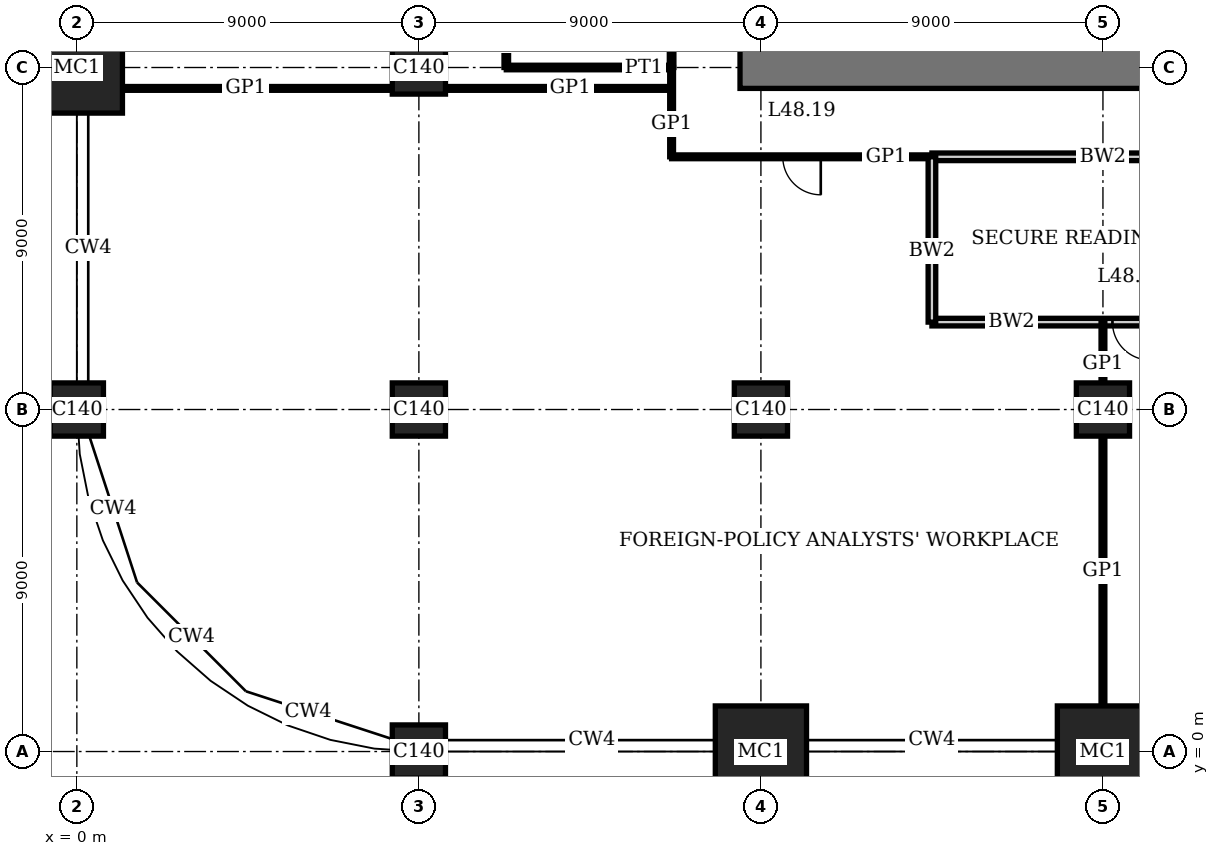
"""IFC4 building model, lengths in metres.
Left out: names, types, materials, properties, quantities, classifications, styles, units other than length and angle.
Written with IfcOpenShell. Run it as: python <this file> out.ifc"""

import sys

from ifc_helpers import new_model, si_unit, direction, frame, frame_2d, origin, origin_2d, place, context, subcontext, project, spatial, rectangle, extrude, element, fill, save


model = new_model("IFC4")
c1 = context("Model", 3, precision=1e-05, world=origin(), true_north=direction((0.0, 1.0)))
c2 = subcontext(c1, "Body", "Model", "MODEL_VIEW")
j1 = project(units=[si_unit("LENGTHUNIT", "METRE"), si_unit("PLANEANGLEUNIT", "RADIAN")], contexts=[c1])
p1 = place(None, origin())
s1 = spatial("IfcSite", under=j1, at=p1, CompositionType="ELEMENT")
p2 = place(p1, origin())
s2 = spatial("IfcBuilding", under=s1, at=p2, CompositionType="ELEMENT")
p3 = place(p2, frame((0.0, 0.0, 198.2)))
s3 = spatial("IfcBuildingStorey", under=s2, at=p3, CompositionType="ELEMENT", Elevation=198.2)
p4 = place(p3, frame((0.0, 9.0, 0.0), z_axis=(0.0, 0.0, 1.0), x_axis=(1.0, 0.0, 0.0)))
e1 = element("IfcColumn", 1, at=p4, inside=s3, PredefinedType="COLUMN", context=c2, shape_type="SweptSolid", body=[
    extrude(rectangle(XDim=1.4, YDim=1.4, at=origin_2d()), origin(), (0.0, 0.0, 1.0), 4.0),
])
p5 = place(p3, frame((0.0, 18.0, 0.0), z_axis=(0.0, 0.0, 1.0), x_axis=(1.0, 0.0, 0.0)))
e2 = element("IfcColumn", 2, at=p5, inside=s3, PredefinedType="COLUMN", context=c2, shape_type="SweptSolid", body=[
    extrude(rectangle(XDim=2.4, YDim=2.4, at=origin_2d()), origin(), (0.0, 0.0, 1.0), 4.0),
])
for number, where, z_axis, x_axis in (
    (3, (9.0, 0.0, 0.0), (0.0, 0.0, 1.0), (1.0, 0.0, 0.0)),
    (4, (9.0, 9.0, 0.0), (0.0, 0.0, 1.0), (1.0, 0.0, 0.0)),
    (5, (9.0, 18.0, 0.0), (0.0, 0.0, 1.0), (1.0, 0.0, 0.0)),
):
    element("IfcColumn", number, at=place(p3, frame(where, z_axis=z_axis, x_axis=x_axis)), inside=s3, PredefinedType="COLUMN", context=c2, shape_type="SweptSolid", body=[
        extrude(rectangle(XDim=1.4, YDim=1.4, at=origin_2d()), origin(), (0.0, 0.0, 1.0), 4.0),
    ])
p6 = place(p3, frame((18.0, 0.0, 0.0), z_axis=(0.0, 0.0, 1.0), x_axis=(1.0, 0.0, 0.0)))
e6 = element("IfcColumn", 6, at=p6, inside=s3, PredefinedType="COLUMN", context=c2, shape_type="SweptSolid", body=[
    extrude(rectangle(XDim=2.4, YDim=2.4, at=origin_2d()), origin(), (0.0, 0.0, 1.0), 4.0),
])
p7 = place(p3, frame((18.0, 9.0, 0.0), z_axis=(0.0, 0.0, 1.0), x_axis=(1.0, 0.0, 0.0)))
e7 = element("IfcColumn", 7, at=p7, inside=s3, PredefinedType="COLUMN", context=c2, shape_type="SweptSolid", body=[
    extrude(rectangle(XDim=1.4, YDim=1.4, at=origin_2d()), origin(), (0.0, 0.0, 1.0), 4.0),
])
p8 = place(p3, frame((27.0, 0.0, 0.0), z_axis=(0.0, 0.0, 1.0), x_axis=(1.0, 0.0, 0.0)))
e8 = element("IfcColumn", 8, at=p8, inside=s3, PredefinedType="COLUMN", context=c2, shape_type="SweptSolid", body=[
    extrude(rectangle(XDim=2.4, YDim=2.4, at=origin_2d()), origin(), (0.0, 0.0, 1.0), 4.0),
])
p9 = place(p3, frame((27.0, 9.0, 0.0), z_axis=(0.0, 0.0, 1.0), x_axis=(1.0, 0.0, 0.0)))
e9 = element("IfcColumn", 9, at=p9, inside=s3, PredefinedType="COLUMN", context=c2, shape_type="SweptSolid", body=[
    extrude(rectangle(XDim=1.4, YDim=1.4, at=origin_2d()), origin(), (0.0, 0.0, 1.0), 4.0),
])
p10 = place(p3, frame((17.45, 18.0, 0.0), z_axis=(0.0, 0.0, 1.0), x_axis=(1.0, 0.0, 0.0)))
e10 = element("IfcWall", 10, at=p10, inside=s3, PredefinedType="SHEAR", context=c2, shape_type="SweptSolid", body=[
    extrude(rectangle(XDim=28.1, YDim=1.1, at=frame_2d((14.05, 0.0))), origin(), (0.0, 0.0, 1.0), 4.0),
])
p11 = place(p10, frame((11.55, 0.0, 0.0)))
e11 = element("IfcOpeningElement", 11, at=p11, cuts=e10, PredefinedType="OPENING", context=c2, shape_type="SweptSolid", body=[
    extrude(rectangle(XDim=1.0, YDim=2.4, at=frame_2d((0.5, 1.2))), frame((0.0, 0.56, 0.0), z_axis=(0.0, -1.0, 0.0), x_axis=(1.0, 0.0, 0.0)), (0.0, 0.0, 1.0), 1.12),
])
p12 = place(p10, frame((16.55, 0.0, 0.0)))
e12 = element("IfcOpeningElement", 12, at=p12, cuts=e10, PredefinedType="OPENING", context=c2, shape_type="SweptSolid", body=[
    extrude(rectangle(XDim=1.0, YDim=2.4, at=frame_2d((0.5, 1.2))), frame((0.0, 0.56, 0.0), z_axis=(0.0, -1.0, 0.0), x_axis=(1.0, 0.0, 0.0)), (0.0, 0.0, 1.0), 1.12),
])
p13 = place(p10, frame((20.0, 0.0, 0.0)))
e13 = element("IfcOpeningElement", 13, at=p13, cuts=e10, PredefinedType="OPENING", context=c2, shape_type="SweptSolid", body=[
    extrude(rectangle(XDim=1.1, YDim=2.4, at=frame_2d((0.55, 1.2))), frame((0.0, 0.56, 0.0), z_axis=(0.0, -1.0, 0.0), x_axis=(1.0, 0.0, 0.0)), (0.0, 0.0, 1.0), 1.12),
])
p14 = place(p10, frame((24.05, 0.0, 0.0)))
e14 = element("IfcOpeningElement", 14, at=p14, cuts=e10, PredefinedType="OPENING", context=c2, shape_type="SweptSolid", body=[
    extrude(rectangle(XDim=1.0, YDim=2.4, at=frame_2d((0.5, 1.2))), frame((0.0, 0.56, 0.0), z_axis=(0.0, -1.0, 0.0), x_axis=(1.0, 0.0, 0.0)), (0.0, 0.0, 1.0), 1.12),
])
p15 = place(p3, frame((22.5, 11.3, 0.0), z_axis=(0.0, 0.0, 1.0), x_axis=(1.0, 0.0, 0.0)))
e15 = element("IfcWall", 15, at=p15, inside=s3, PredefinedType="SOLIDWALL", context=c2, shape_type="SweptSolid", body=[
    extrude(rectangle(XDim=9.0, YDim=0.2, at=frame_2d((4.5, 0.0))), origin(), (0.0, 0.0, 1.0), 3.75),
])
p16 = place(p15, frame((4.75, 0.0, 0.0)))
e16 = element("IfcOpeningElement", 16, at=p16, cuts=e15, PredefinedType="OPENING", context=c2, shape_type="SweptSolid", body=[
    extrude(rectangle(XDim=1.0, YDim=2.4, at=frame_2d((0.5, 1.2))), frame((0.0, 0.11, 0.0), z_axis=(0.0, -1.0, 0.0), x_axis=(1.0, 0.0, 0.0)), (0.0, 0.0, 1.0), 0.22),
])
p17 = place(p3, frame((22.5, 15.65, 0.0), z_axis=(0.0, 0.0, 1.0), x_axis=(1.0, 0.0, 0.0)))
e17 = element("IfcWall", 17, at=p17, inside=s3, PredefinedType="SOLIDWALL", context=c2, shape_type="SweptSolid", body=[
    extrude(rectangle(XDim=9.0, YDim=0.2, at=frame_2d((4.5, 0.0))), origin(), (0.0, 0.0, 1.0), 3.75),
])
p18 = place(p3, frame((15.65, 15.65, 0.0), z_axis=(0.0, 0.0, 1.0), x_axis=(1.0, 0.0, 0.0)))
e18 = element("IfcWall", 18, at=p18, inside=s3, PredefinedType="PARTITIONING", context=c2, shape_type="SweptSolid", body=[
    extrude(rectangle(XDim=6.85, YDim=0.1, at=frame_2d((3.425, 0.0))), origin(), (0.0, 0.0, 1.0), 3.75),
])
p19 = place(p18, frame((2.925, 0.0, 0.0)))
e19 = element("IfcOpeningElement", 19, at=p19, cuts=e18, PredefinedType="OPENING", context=c2, shape_type="SweptSolid", body=[
    extrude(rectangle(XDim=1.0, YDim=2.4, at=frame_2d((0.5, 1.2))), frame((0.0, 0.06, 0.0), z_axis=(0.0, -1.0, 0.0), x_axis=(1.0, 0.0, 0.0)), (0.0, 0.0, 1.0), 0.12),
])
p20 = place(p3, frame((1.2, 17.45, 0.0), z_axis=(0.0, 0.0, 1.0), x_axis=(1.0, 0.0, 0.0)))
e20 = element("IfcWall", 20, at=p20, inside=s3, PredefinedType="PARTITIONING", context=c2, shape_type="SweptSolid", body=[
    extrude(rectangle(XDim=7.1, YDim=0.1, at=frame_2d((3.55, 0.0))), origin(), (0.0, 0.0, 1.0), 3.75),
])
p21 = place(p3, frame((9.7, 17.45, 0.0), z_axis=(0.0, 0.0, 1.0), x_axis=(1.0, 0.0, 0.0)))
e21 = element("IfcWall", 21, at=p21, inside=s3, PredefinedType="PARTITIONING", context=c2, shape_type="SweptSolid", body=[
    extrude(rectangle(XDim=5.95, YDim=0.1, at=frame_2d((2.975, 0.0))), origin(), (0.0, 0.0, 1.0), 3.75),
])
p22 = place(p3, frame((11.3, 18.0, 0.0), z_axis=(0.0, 0.0, 1.0), x_axis=(1.0, 0.0, 0.0)))
e22 = element("IfcWall", 22, at=p22, inside=s3, PredefinedType="PARTITIONING", context=c2, shape_type="SweptSolid", body=[
    extrude(rectangle(XDim=4.35, YDim=0.12, at=frame_2d((2.175, 0.0))), origin(), (0.0, 0.0, 1.0), 3.05),
])
p23 = place(p3, frame((11.3, 18.0, 0.0), z_axis=(0.0, 0.0, 1.0), x_axis=(0.0, 1.0, 0.0)))
e23 = element("IfcWall", 23, at=p23, inside=s3, PredefinedType="PARTITIONING", context=c2, shape_type="SweptSolid", body=[
    extrude(rectangle(XDim=4.5, YDim=0.12, at=frame_2d((2.25, 0.0))), origin(), (0.0, 0.0, 1.0), 3.75),
])
p24 = place(p23, frame((1.75, 0.0, 0.0)))
e24 = element("IfcOpeningElement", 24, at=p24, cuts=e23, PredefinedType="OPENING", context=c2, shape_type="SweptSolid", body=[
    extrude(rectangle(XDim=1.0, YDim=2.4, at=frame_2d((0.5, 1.2))), frame((0.0, 0.07, 0.0), z_axis=(0.0, -1.0, 0.0), x_axis=(1.0, 0.0, 0.0)), (0.0, 0.0, 1.0), 0.14),
])
p25 = place(p3, frame((15.65, 18.0, 0.0), z_axis=(0.0, 0.0, 1.0), x_axis=(0.0, 1.0, 0.0)))
e25 = element("IfcWall", 25, at=p25, inside=s3, PredefinedType="PARTITIONING", context=c2, shape_type="SweptSolid", body=[
    extrude(rectangle(XDim=4.5, YDim=0.12, at=frame_2d((2.25, 0.0))), origin(), (0.0, 0.0, 1.0), 3.75),
])
p26 = place(p3, frame((15.65, 15.65, 0.0), z_axis=(0.0, 0.0, 1.0), x_axis=(0.0, 1.0, 0.0)))
e26 = element("IfcWall", 26, at=p26, inside=s3, PredefinedType="PARTITIONING", context=c2, shape_type="SweptSolid", body=[
    extrude(rectangle(XDim=2.35, YDim=0.1, at=frame_2d((1.175, 0.0))), origin(), (0.0, 0.0, 1.0), 3.75),
])
p27 = place(p3, frame((22.5, 11.3, 0.0), z_axis=(0.0, 0.0, 1.0), x_axis=(0.0, 1.0, 0.0)))
e27 = element("IfcWall", 27, at=p27, inside=s3, PredefinedType="SOLIDWALL", context=c2, shape_type="SweptSolid", body=[
    extrude(rectangle(XDim=4.35, YDim=0.2, at=frame_2d((2.175, 0.0))), origin(), (0.0, 0.0, 1.0), 3.75),
])
p28 = place(p3, frame((27.0, 1.2, 0.0), z_axis=(0.0, 0.0, 1.0), x_axis=(0.0, 1.0, 0.0)))
e28 = element("IfcWall", 28, at=p28, inside=s3, PredefinedType="PARTITIONING", context=c2, shape_type="SweptSolid", body=[
    extrude(rectangle(XDim=7.1, YDim=0.1, at=frame_2d((3.55, 0.0))), origin(), (0.0, 0.0, 1.0), 3.05),
])
p29 = place(p3, frame((27.0, 9.7, 0.0), z_axis=(0.0, 0.0, 1.0), x_axis=(0.0, 1.0, 0.0)))
e29 = element("IfcWall", 29, at=p29, inside=s3, PredefinedType="PARTITIONING", context=c2, shape_type="SweptSolid", body=[
    extrude(rectangle(XDim=1.61, YDim=0.1, at=frame_2d((0.805, 0.0))), origin(), (0.0, 0.0, 1.0), 3.05),
])
p30 = place(p16, origin())
e30 = element("IfcDoor", 30, at=p30, inside=s3, OperationType="SINGLE_SWING_RIGHT", PredefinedType="DOOR", context=c2, shape_type="SweptSolid", body=[
    extrude(rectangle(XDim=1.0, YDim=2.4, at=frame_2d((0.5, 1.2))), frame((0.0, 0.035, 0.0), z_axis=(0.0, -1.0, 0.0), x_axis=(1.0, 0.0, 0.0)), (0.0, 0.0, 1.0), 0.07),
])
fill(e16, e30)
p31 = place(p19, origin())
e31 = element("IfcDoor", 31, at=p31, inside=s3, OperationType="SINGLE_SWING_RIGHT", PredefinedType="DOOR", context=c2, shape_type="SweptSolid", body=[
    extrude(rectangle(XDim=1.0, YDim=2.4, at=frame_2d((0.5, 1.2))), frame((0.0, 0.02, 0.0), z_axis=(0.0, -1.0, 0.0), x_axis=(1.0, 0.0, 0.0)), (0.0, 0.0, 1.0), 0.04),
])
fill(e19, e31)
save(model, sys.argv[1])
